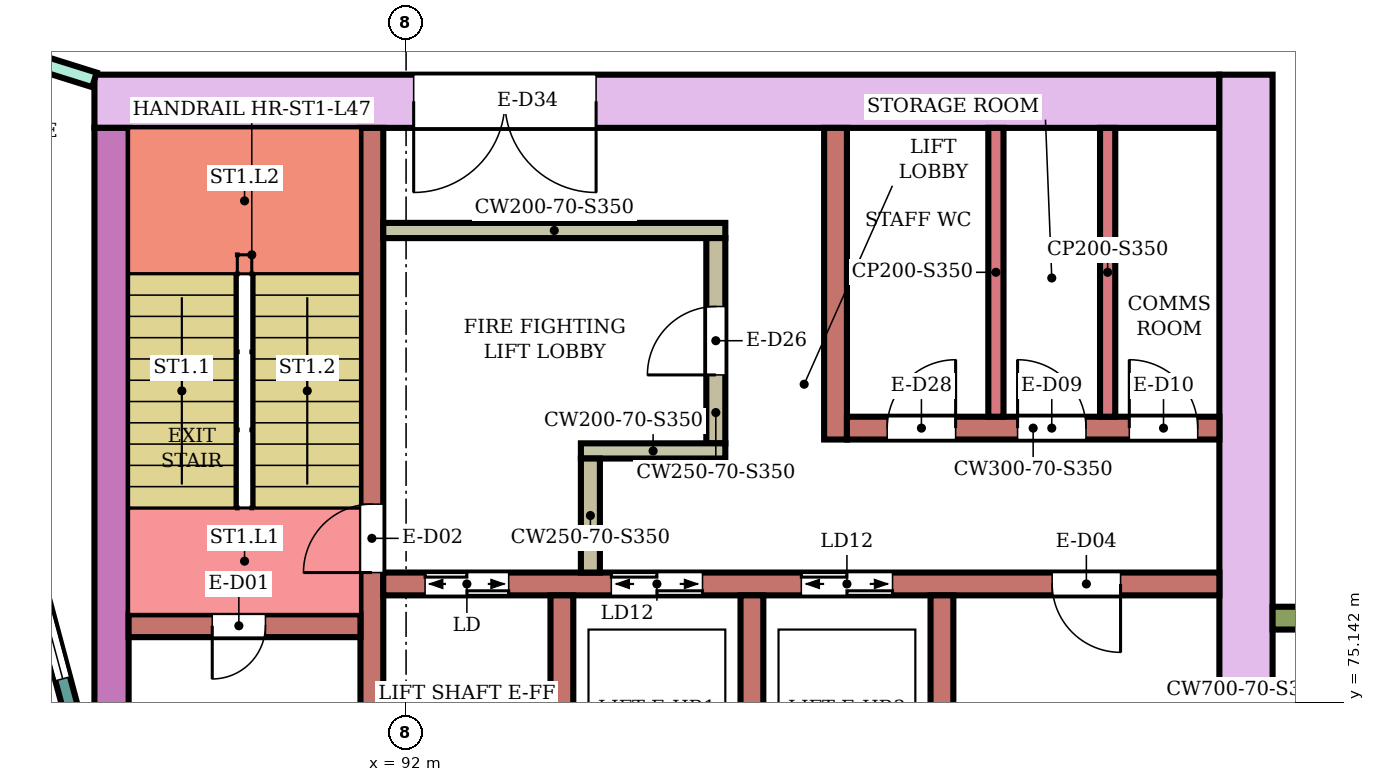
"""IFC4 building model, lengths in metres.
Left out: names, types, materials, properties, quantities, classifications, styles, units other than length and angle.
Written with IfcOpenShell. Run it as: python <this file> out.ifc"""

import sys

from ifc_helpers import new_model, si_unit, direction, frame, frame_2d, origin, place, context, subcontext, project, spatial, rectangle, extrude, element, fill, save


model = new_model("IFC4")
c1 = context("Model", 3, precision=1e-05, world=origin(), true_north=direction((0.0, 1.0)))
c2 = subcontext(c1, "Body", "Model", "MODEL_VIEW")
j1 = project(units=[si_unit("LENGTHUNIT", "METRE"), si_unit("PLANEANGLEUNIT", "RADIAN")], contexts=[c1])
p1 = place(None, origin())
s1 = spatial("IfcSite", under=j1, at=p1, CompositionType="ELEMENT")
p2 = place(p1, origin())
s2 = spatial("IfcBuilding", under=s1, at=p2, CompositionType="ELEMENT")
p3 = place(p2, frame((0.0, 0.0, 202.8)))
s3 = spatial("IfcBuildingStorey", under=s2, at=p3, CompositionType="ELEMENT", Elevation=202.8)
p4 = place(p3, frame((87.9, 83.05, 0.0), z_axis=(0.0, 0.0, 1.0), x_axis=(1.0, 0.0, 0.0)))
e1 = element("IfcWall", 1, at=p4, inside=s3, PredefinedType="SHEAR", context=c2, shape_type="SweptSolid", body=[
    extrude(rectangle(XDim=14.8, YDim=0.7, at=frame_2d((7.4, 0.0))), origin(), (0.0, 0.0, 1.0), 3.75),
])
p5 = place(p4, frame((4.2, 0.0, 0.0)))
e2 = element("IfcOpeningElement", 2, at=p5, cuts=e1, PredefinedType="OPENING", context=c2, shape_type="SweptSolid", body=[
    extrude(rectangle(XDim=2.4, YDim=2.4, at=frame_2d((1.2, 1.2))), frame((0.0, 0.36, 0.0), z_axis=(0.0, -1.0, 0.0), x_axis=(1.0, 0.0, 0.0)), (0.0, 0.0, 1.0), 0.72),
])
p6 = place(p3, frame((88.125, 75.0, 0.0), z_axis=(0.0, 0.0, 1.0), x_axis=(0.0, 1.0, 0.0)))
e3 = element("IfcWall", 3, at=p6, inside=s3, PredefinedType="SHEAR", context=c2, shape_type="SweptSolid", body=[
    extrude(rectangle(XDim=7.7, YDim=0.45, at=frame_2d((3.85, 0.0))), origin(), (0.0, 0.0, 1.0), 3.75),
])
p7 = place(p3, frame((103.05, 66.6, 0.0), z_axis=(0.0, 0.0, 1.0), x_axis=(0.0, 1.0, 0.0)))
e4 = element("IfcWall", 4, at=p7, inside=s3, PredefinedType="SHEAR", context=c2, shape_type="SweptSolid", body=[
    extrude(rectangle(XDim=16.8, YDim=0.7, at=frame_2d((8.4, 0.0))), origin(), (0.0, 0.0, 1.0), 3.75),
])
p8 = place(p3, frame((91.55, 75.0, 0.0), z_axis=(0.0, 0.0, 1.0), x_axis=(0.0, 1.0, 0.0)))
e5 = element("IfcWall", 5, at=p8, inside=s3, PredefinedType="SHEAR", context=c2, shape_type="SweptSolid", body=[
    extrude(rectangle(XDim=7.7, YDim=0.3, at=frame_2d((3.85, 0.0))), origin(), (0.0, 0.0, 1.0), 3.75),
])
p9 = place(p8, frame((1.85, 0.0, 0.0)))
e6 = element("IfcOpeningElement", 6, at=p9, cuts=e5, PredefinedType="OPENING", context=c2, shape_type="SweptSolid", body=[
    extrude(rectangle(XDim=0.9, YDim=2.1, at=frame_2d((0.45, 1.05))), frame((0.0, 0.16, 0.0), z_axis=(0.0, -1.0, 0.0), x_axis=(1.0, 0.0, 0.0)), (0.0, 0.0, 1.0), 0.32),
])
p10 = place(p3, frame((88.35, 76.15, 0.0), z_axis=(0.0, 0.0, 1.0), x_axis=(1.0, 0.0, 0.0)))
e7 = element("IfcWall", 7, at=p10, inside=s3, PredefinedType="SHEAR", context=c2, shape_type="SweptSolid", body=[
    extrude(rectangle(XDim=3.05, YDim=0.3, at=frame_2d((1.525, 0.0))), origin(), (0.0, 0.0, 1.0), 3.75),
])
p11 = place(p10, frame((1.1, 0.0, 0.0)))
e8 = element("IfcOpeningElement", 8, at=p11, cuts=e7, PredefinedType="OPENING", context=c2, shape_type="SweptSolid", body=[
    extrude(rectangle(XDim=0.7, YDim=2.0, at=frame_2d((0.35, 1.0))), frame((0.0, 0.16, 0.0), z_axis=(0.0, -1.0, 0.0), x_axis=(1.0, 0.0, 0.0)), (0.0, 0.0, 1.0), 0.32),
])
p12 = place(p3, frame((91.7, 76.7, 0.0), z_axis=(0.0, 0.0, 1.0), x_axis=(1.0, 0.0, 0.0)))
e9 = element("IfcWall", 9, at=p12, inside=s3, PredefinedType="SHEAR", context=c2, shape_type="SweptSolid", body=[
    extrude(rectangle(XDim=11.0, YDim=0.3, at=frame_2d((5.5, 0.0))), origin(), (0.0, 0.0, 1.0), 3.75),
])
p13 = place(p12, frame((0.55, 0.0, 0.0)))
e10 = element("IfcOpeningElement", 10, at=p13, cuts=e9, PredefinedType="OPENING", context=c2, shape_type="SweptSolid", body=[
    extrude(rectangle(XDim=1.1, YDim=2.1, at=frame_2d((0.55, 1.05))), frame((0.0, 0.16, 0.0), z_axis=(0.0, -1.0, 0.0), x_axis=(1.0, 0.0, 0.0)), (0.0, 0.0, 1.0), 0.32),
])
p14 = place(p12, frame((3.0, 0.0, 0.0)))
e11 = element("IfcOpeningElement", 11, at=p14, cuts=e9, PredefinedType="OPENING", context=c2, shape_type="SweptSolid", body=[
    extrude(rectangle(XDim=1.2, YDim=2.1, at=frame_2d((0.6, 1.05))), frame((0.0, 0.16, 0.0), z_axis=(0.0, -1.0, 0.0), x_axis=(1.0, 0.0, 0.0)), (0.0, 0.0, 1.0), 0.32),
])
p15 = place(p12, frame((5.5, 0.0, 0.0)))
e12 = element("IfcOpeningElement", 12, at=p15, cuts=e9, PredefinedType="OPENING", context=c2, shape_type="SweptSolid", body=[
    extrude(rectangle(XDim=1.2, YDim=2.1, at=frame_2d((0.6, 1.05))), frame((0.0, 0.16, 0.0), z_axis=(0.0, -1.0, 0.0), x_axis=(1.0, 0.0, 0.0)), (0.0, 0.0, 1.0), 0.32),
])
p16 = place(p12, frame((8.8, 0.0, 0.0)))
e13 = element("IfcOpeningElement", 13, at=p16, cuts=e9, PredefinedType="OPENING", context=c2, shape_type="SweptSolid", body=[
    extrude(rectangle(XDim=0.9, YDim=2.1, at=frame_2d((0.45, 1.05))), frame((0.0, 0.16, 0.0), z_axis=(0.0, -1.0, 0.0), x_axis=(1.0, 0.0, 0.0)), (0.0, 0.0, 1.0), 0.32),
])
for number, where, z_axis, x_axis in (
    (14, (94.05, 74.0, 0.0), (0.0, 0.0, 1.0), (0.0, 1.0, 0.0)),
    (15, (96.55, 74.0, 0.0), (0.0, 0.0, 1.0), (0.0, 1.0, 0.0)),
    (16, (99.05, 74.0, 0.0), (0.0, 0.0, 1.0), (0.0, 1.0, 0.0)),
):
    element("IfcWall", number, at=place(p3, frame(where, z_axis=z_axis, x_axis=x_axis)), inside=s3, PredefinedType="SHEAR", context=c2, shape_type="SweptSolid", body=[
        extrude(rectangle(XDim=2.55, YDim=0.3, at=frame_2d((1.275, 0.0))), origin(), (0.0, 0.0, 1.0), 3.75),
    ])
p17 = place(p3, frame((91.7, 81.35, 0.0), z_axis=(0.0, 0.0, 1.0), x_axis=(1.0, 0.0, 0.0)))
e17 = element("IfcWall", 17, at=p17, inside=s3, PredefinedType="SHEAR", context=c2, shape_type="SweptSolid", body=[
    extrude(rectangle(XDim=4.5, YDim=0.2, at=frame_2d((2.25, 0.0))), origin(), (0.0, 0.0, 1.0), 3.75),
])
p18 = place(p3, frame((96.075, 78.55, 0.0), z_axis=(0.0, 0.0, 1.0), x_axis=(0.0, 1.0, 0.0)))
e18 = element("IfcWall", 18, at=p18, inside=s3, PredefinedType="SHEAR", context=c2, shape_type="SweptSolid", body=[
    extrude(rectangle(XDim=2.7, YDim=0.25, at=frame_2d((1.35, 0.0))), origin(), (0.0, 0.0, 1.0), 3.75),
])
p19 = place(p18, frame((0.9, 0.0, 0.0)))
e19 = element("IfcOpeningElement", 19, at=p19, cuts=e18, PredefinedType="OPENING", context=c2, shape_type="SweptSolid", body=[
    extrude(rectangle(XDim=0.9, YDim=2.1, at=frame_2d((0.45, 1.05))), frame((0.0, 0.135, 0.0), z_axis=(0.0, -1.0, 0.0), x_axis=(1.0, 0.0, 0.0)), (0.0, 0.0, 1.0), 0.27),
])
p20 = place(p3, frame((94.3, 78.45, 0.0), z_axis=(0.0, 0.0, 1.0), x_axis=(1.0, 0.0, 0.0)))
e20 = element("IfcWall", 20, at=p20, inside=s3, PredefinedType="SHEAR", context=c2, shape_type="SweptSolid", body=[
    extrude(rectangle(XDim=1.9, YDim=0.2, at=frame_2d((0.95, 0.0))), origin(), (0.0, 0.0, 1.0), 3.75),
])
p21 = place(p3, frame((94.425, 76.85, 0.0), z_axis=(0.0, 0.0, 1.0), x_axis=(0.0, 1.0, 0.0)))
e21 = element("IfcWall", 21, at=p21, inside=s3, PredefinedType="SHEAR", context=c2, shape_type="SweptSolid", body=[
    extrude(rectangle(XDim=1.5, YDim=0.25, at=frame_2d((0.75, 0.0))), origin(), (0.0, 0.0, 1.0), 3.75),
])
p22 = place(p3, frame((97.65, 78.6, 0.0), z_axis=(0.0, 0.0, 1.0), x_axis=(0.0, 1.0, 0.0)))
e22 = element("IfcWall", 22, at=p22, inside=s3, PredefinedType="SHEAR", context=c2, shape_type="SweptSolid", body=[
    extrude(rectangle(XDim=4.1, YDim=0.3, at=frame_2d((2.05, 0.0))), origin(), (0.0, 0.0, 1.0), 3.75),
])
p23 = place(p3, frame((97.8, 78.75, 0.0), z_axis=(0.0, 0.0, 1.0), x_axis=(1.0, 0.0, 0.0)))
e23 = element("IfcWall", 23, at=p23, inside=s3, PredefinedType="SHEAR", context=c2, shape_type="SweptSolid", body=[
    extrude(rectangle(XDim=4.9, YDim=0.3, at=frame_2d((2.45, 0.0))), origin(), (0.0, 0.0, 1.0), 3.75),
])
p24 = place(p23, frame((0.53, 0.0, 0.0)))
e24 = element("IfcOpeningElement", 24, at=p24, cuts=e23, PredefinedType="OPENING", context=c2, shape_type="SweptSolid", body=[
    extrude(rectangle(XDim=0.9, YDim=2.1, at=frame_2d((0.45, 1.05))), frame((0.0, 0.16, 0.0), z_axis=(0.0, -1.0, 0.0), x_axis=(1.0, 0.0, 0.0)), (0.0, 0.0, 1.0), 0.32),
])
p25 = place(p23, frame((2.245, 0.0, 0.0)))
e25 = element("IfcOpeningElement", 25, at=p25, cuts=e23, PredefinedType="OPENING", context=c2, shape_type="SweptSolid", body=[
    extrude(rectangle(XDim=0.9, YDim=2.1, at=frame_2d((0.45, 1.05))), frame((0.0, 0.16, 0.0), z_axis=(0.0, -1.0, 0.0), x_axis=(1.0, 0.0, 0.0)), (0.0, 0.0, 1.0), 0.32),
])
p26 = place(p23, frame((3.715, 0.0, 0.0)))
e26 = element("IfcOpeningElement", 26, at=p26, cuts=e23, PredefinedType="OPENING", context=c2, shape_type="SweptSolid", body=[
    extrude(rectangle(XDim=0.9, YDim=2.1, at=frame_2d((0.45, 1.05))), frame((0.0, 0.16, 0.0), z_axis=(0.0, -1.0, 0.0), x_axis=(1.0, 0.0, 0.0)), (0.0, 0.0, 1.0), 0.32),
])
p27 = place(p3, frame((103.4, 76.25, 0.0), z_axis=(0.0, 0.0, 1.0), x_axis=(1.0, 0.0, 0.0)))
e27 = element("IfcWall", 27, at=p27, inside=s3, PredefinedType="NOTDEFINED", context=c2, shape_type="SweptSolid", body=[
    extrude(rectangle(XDim=2.416, YDim=0.3, at=frame_2d((1.208, 0.0))), origin(), (0.0, 0.0, 1.0), 4.1),
])
p28 = place(p3, frame((87.604, 75.0, 0.0), z_axis=(0.0, 0.0, 1.0), x_axis=(-0.258789828301, 0.965933654434, 0.0)))
e28 = element("IfcWall", 28, at=p28, inside=s3, PredefinedType="NOTDEFINED", context=c2, shape_type="SweptSolid", body=[
    extrude(rectangle(XDim=3.936, YDim=0.2, at=frame_2d((1.968, 0.0))), origin(), (0.0, 0.0, 1.0), 4.1),
])
p29 = place(p28, frame((0.468, 0.0, 0.9)))
e29 = element("IfcOpeningElement", 29, at=p29, cuts=e28, PredefinedType="OPENING", context=c2, shape_type="SweptSolid", body=[
    extrude(rectangle(XDim=3.0, YDim=2.3, at=frame_2d((1.5, 1.15))), frame((0.0, 0.11, 0.0), z_axis=(0.0, -1.0, 0.0), x_axis=(1.0, 0.0, 0.0)), (0.0, 0.0, 1.0), 0.22),
])
p30 = place(p3, frame((85.587, 84.057, 0.0), z_axis=(0.0, 0.0, 1.0), x_axis=(0.954210767728, -0.299135104513, 0.0)))
e30 = element("IfcWall", 30, at=p30, inside=s3, PredefinedType="PARTITIONING", context=c2, shape_type="SweptSolid", body=[
    extrude(rectangle(XDim=2.424, YDim=0.2, at=frame_2d((1.212, 0.0))), origin(), (0.0, 0.0, 1.0), 3.65),
])
for number, where, z_axis, x_axis in (
    (31, (99.76, 78.9, 0.0), (0.0, 0.0, 1.0), (0.0, 1.0, 0.0)),
    (32, (101.23, 78.9, 0.0), (0.0, 0.0, 1.0), (0.0, 1.0, 0.0)),
):
    element("IfcWall", number, at=place(p3, frame(where, z_axis=z_axis, x_axis=x_axis)), inside=s3, PredefinedType="PARTITIONING", context=c2, shape_type="SweptSolid", body=[
        extrude(rectangle(XDim=3.8, YDim=0.2, at=frame_2d((1.9, 0.0))), origin(), (0.0, 0.0, 1.0), 3.75),
    ])
p31 = place(p29, origin())
e33 = element("IfcWindow", 33, at=p31, inside=s3, PartitioningType="SINGLE_PANEL", PredefinedType="WINDOW", context=c2, shape_type="SweptSolid", body=[
    extrude(rectangle(XDim=3.0, YDim=2.3, at=frame_2d((1.5, 1.15))), frame((0.0, 0.03, 0.0), z_axis=(0.0, -1.0, 0.0), x_axis=(1.0, 0.0, 0.0)), (0.0, 0.0, 1.0), 0.06),
])
fill(e29, e33)
p32 = place(p11, frame((0.7, 0.0, 0.0), z_axis=(0.0, 0.0, 1.0), x_axis=(-1.0, 0.0, 0.0)))
e34 = element("IfcDoor", 34, at=p32, inside=s3, OperationType="SINGLE_SWING_RIGHT", PredefinedType="DOOR", context=c2, shape_type="SweptSolid", body=[
    extrude(rectangle(XDim=0.7, YDim=2.0, at=frame_2d((0.35, 1.0))), frame((0.0, 0.025, 0.0), z_axis=(0.0, -1.0, 0.0), x_axis=(1.0, 0.0, 0.0)), (0.0, 0.0, 1.0), 0.05),
])
fill(e8, e34)
p33 = place(p9, origin())
e35 = element("IfcDoor", 35, at=p33, inside=s3, OperationType="SINGLE_SWING_LEFT", PredefinedType="DOOR", context=c2, shape_type="SweptSolid", body=[
    extrude(rectangle(XDim=0.9, YDim=2.1, at=frame_2d((0.45, 1.05))), frame((0.0, 0.025, 0.0), z_axis=(0.0, -1.0, 0.0), x_axis=(1.0, 0.0, 0.0)), (0.0, 0.0, 1.0), 0.05),
])
fill(e6, e35)
p34 = place(p13, origin())
e36 = element("IfcDoor", 36, at=p34, inside=s3, OperationType="DOUBLE_DOOR_SLIDING", PredefinedType="DOOR", context=c2, shape_type="SweptSolid", body=[
    extrude(rectangle(XDim=1.1, YDim=2.1, at=frame_2d((0.55, 1.05))), frame((0.0, 0.025, 0.0), z_axis=(0.0, -1.0, 0.0), x_axis=(1.0, 0.0, 0.0)), (0.0, 0.0, 1.0), 0.05),
])
fill(e10, e36)
p35 = place(p14, origin())
e37 = element("IfcDoor", 37, at=p35, inside=s3, OperationType="DOUBLE_DOOR_SLIDING", PredefinedType="DOOR", context=c2, shape_type="SweptSolid", body=[
    extrude(rectangle(XDim=1.2, YDim=2.1, at=frame_2d((0.6, 1.05))), frame((0.0, 0.025, 0.0), z_axis=(0.0, -1.0, 0.0), x_axis=(1.0, 0.0, 0.0)), (0.0, 0.0, 1.0), 0.05),
])
fill(e11, e37)
p36 = place(p15, origin())
e38 = element("IfcDoor", 38, at=p36, inside=s3, OperationType="DOUBLE_DOOR_SLIDING", PredefinedType="DOOR", context=c2, shape_type="SweptSolid", body=[
    extrude(rectangle(XDim=1.2, YDim=2.1, at=frame_2d((0.6, 1.05))), frame((0.0, 0.025, 0.0), z_axis=(0.0, -1.0, 0.0), x_axis=(1.0, 0.0, 0.0)), (0.0, 0.0, 1.0), 0.05),
])
fill(e12, e38)
p37 = place(p16, frame((0.9, 0.0, 0.0), z_axis=(0.0, 0.0, 1.0), x_axis=(-1.0, 0.0, 0.0)))
e39 = element("IfcDoor", 39, at=p37, inside=s3, OperationType="SINGLE_SWING_LEFT", PredefinedType="DOOR", context=c2, shape_type="SweptSolid", body=[
    extrude(rectangle(XDim=0.9, YDim=2.1, at=frame_2d((0.45, 1.05))), frame((0.0, 0.025, 0.0), z_axis=(0.0, -1.0, 0.0), x_axis=(1.0, 0.0, 0.0)), (0.0, 0.0, 1.0), 0.05),
])
fill(e13, e39)
p38 = place(p19, origin())
e40 = element("IfcDoor", 40, at=p38, inside=s3, OperationType="SINGLE_SWING_LEFT", PredefinedType="DOOR", context=c2, shape_type="SweptSolid", body=[
    extrude(rectangle(XDim=0.9, YDim=2.1, at=frame_2d((0.45, 1.05))), frame((0.0, 0.025, 0.0), z_axis=(0.0, -1.0, 0.0), x_axis=(1.0, 0.0, 0.0)), (0.0, 0.0, 1.0), 0.05),
])
fill(e19, e40)
p39 = place(p24, origin())
e41 = element("IfcDoor", 41, at=p39, inside=s3, OperationType="SINGLE_SWING_RIGHT", PredefinedType="DOOR", context=c2, shape_type="SweptSolid", body=[
    extrude(rectangle(XDim=0.9, YDim=2.1, at=frame_2d((0.45, 1.05))), frame((0.0, 0.025, 0.0), z_axis=(0.0, -1.0, 0.0), x_axis=(1.0, 0.0, 0.0)), (0.0, 0.0, 1.0), 0.05),
])
fill(e24, e41)
p40 = place(p25, origin())
e42 = element("IfcDoor", 42, at=p40, inside=s3, OperationType="SINGLE_SWING_LEFT", PredefinedType="DOOR", context=c2, shape_type="SweptSolid", body=[
    extrude(rectangle(XDim=0.9, YDim=2.1, at=frame_2d((0.45, 1.05))), frame((0.0, 0.025, 0.0), z_axis=(0.0, -1.0, 0.0), x_axis=(1.0, 0.0, 0.0)), (0.0, 0.0, 1.0), 0.05),
])
fill(e25, e42)
p41 = place(p26, origin())
e43 = element("IfcDoor", 43, at=p41, inside=s3, OperationType="SINGLE_SWING_LEFT", PredefinedType="DOOR", context=c2, shape_type="SweptSolid", body=[
    extrude(rectangle(XDim=0.9, YDim=2.1, at=frame_2d((0.45, 1.05))), frame((0.0, 0.025, 0.0), z_axis=(0.0, -1.0, 0.0), x_axis=(1.0, 0.0, 0.0)), (0.0, 0.0, 1.0), 0.05),
])
fill(e26, e43)
p42 = place(p5, frame((2.4, 0.0, 0.0), z_axis=(0.0, 0.0, 1.0), x_axis=(-1.0, 0.0, 0.0)))
e44 = element("IfcDoor", 44, at=p42, inside=s3, OperationType="DOUBLE_DOOR_SINGLE_SWING", PredefinedType="DOOR", context=c2, shape_type="SweptSolid", body=[
    extrude(rectangle(XDim=2.4, YDim=2.4, at=frame_2d((1.2, 1.2))), frame((0.0, 0.025, 0.0), z_axis=(0.0, -1.0, 0.0), x_axis=(1.0, 0.0, 0.0)), (0.0, 0.0, 1.0), 0.05),
])
fill(e2, e44)
save(model, sys.argv[1])
